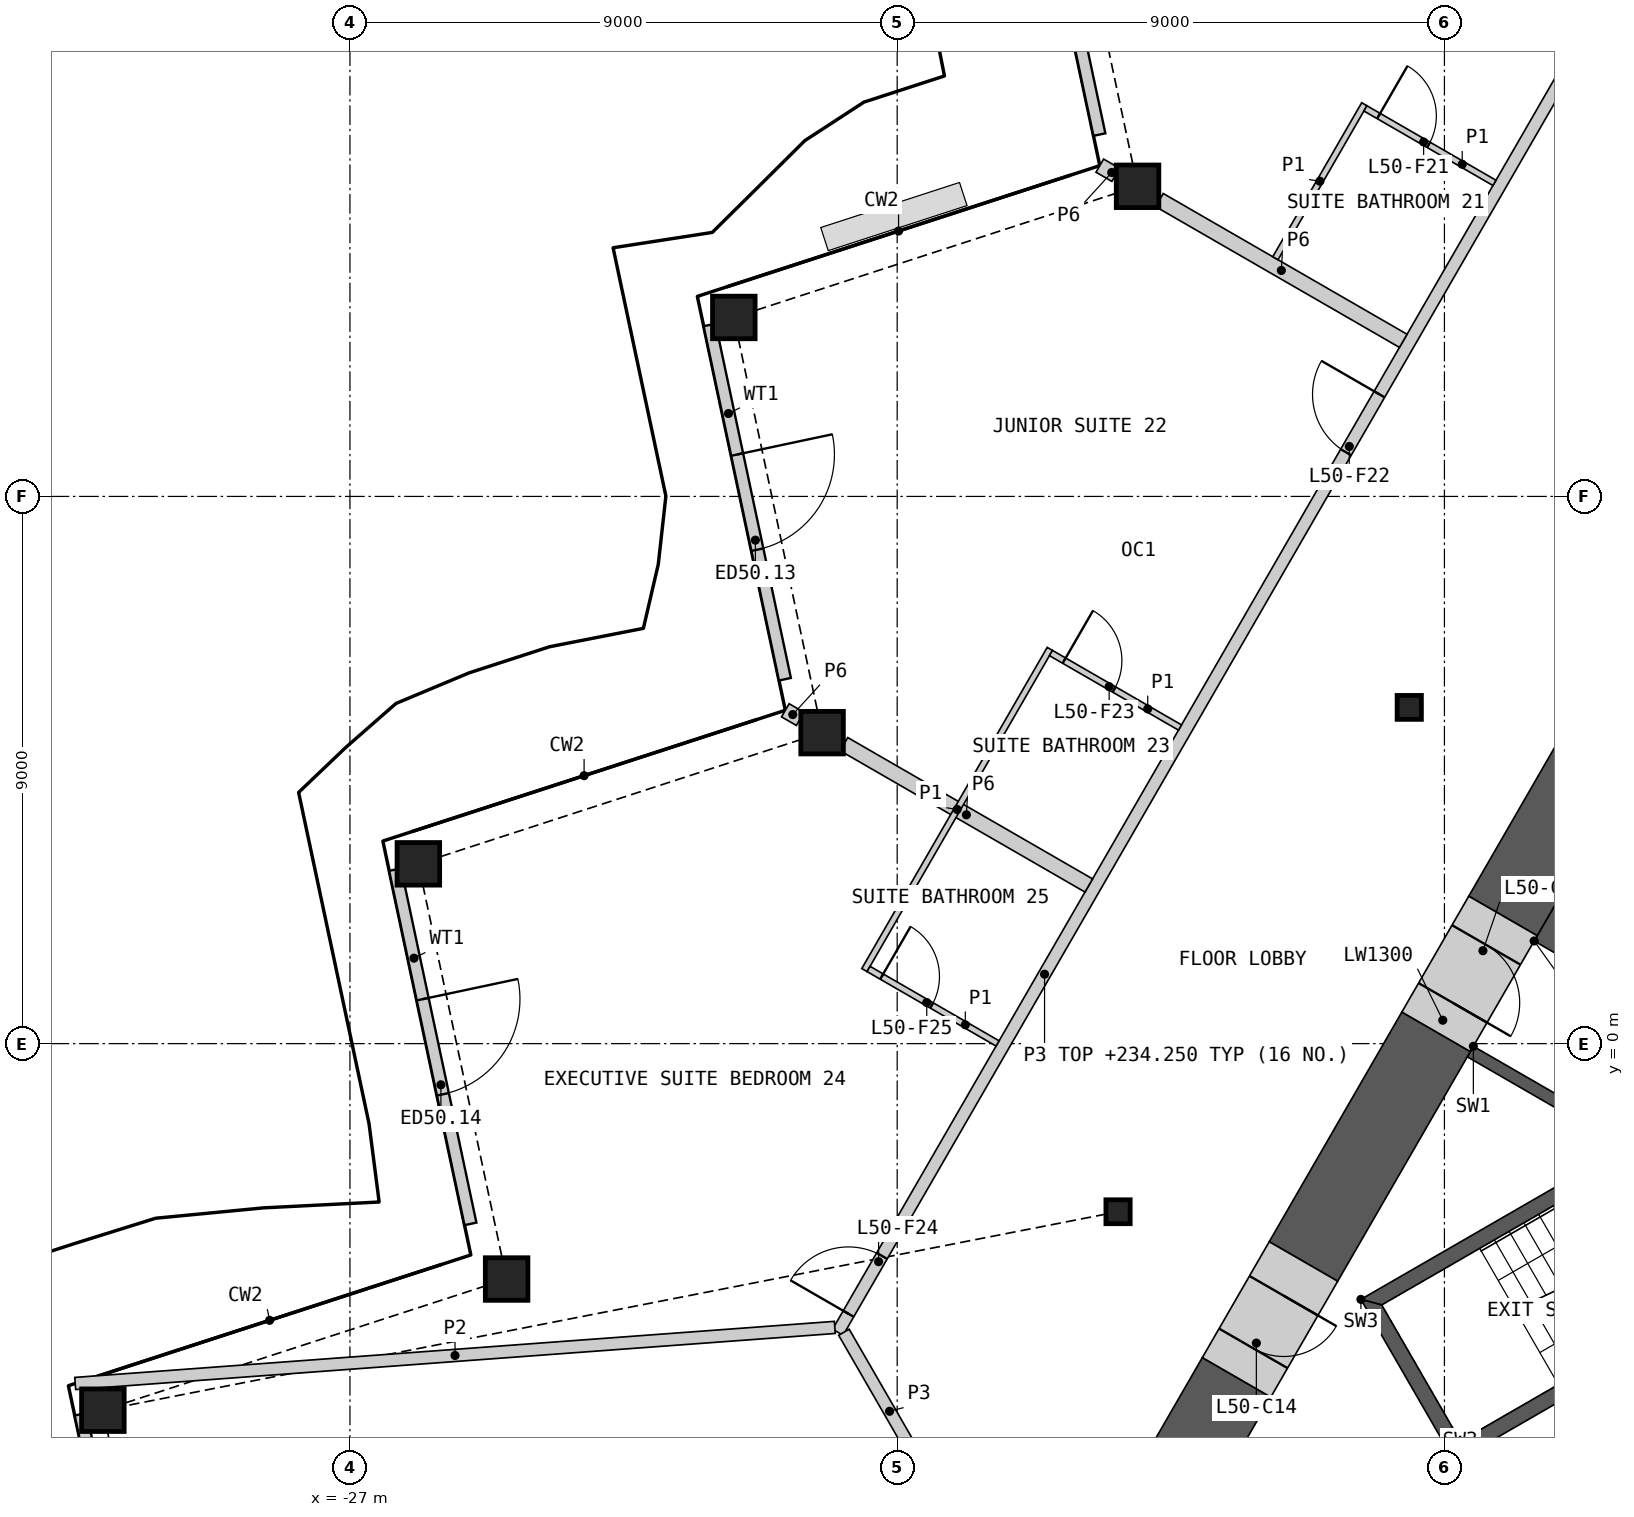
"""IFC4 building model, lengths in metres.
Left out: names, types, materials, properties, quantities, classifications, styles, units other than length and angle.
Written with IfcOpenShell. Run it as: python <this file> out.ifc"""

import sys

from ifc_helpers import new_model, si_unit, direction, frame, frame_2d, origin, origin_2d, place, context, subcontext, project, spatial, polyline, rectangle, hollow_rectangle, i_section, outline, extrude, element, fill, save


model = new_model("IFC4")
c1 = context("Model", 3, precision=1e-05, world=origin(), true_north=direction((0.0, 1.0)))
c2 = subcontext(c1, "Body", "Model", "MODEL_VIEW")
j1 = project(units=[si_unit("LENGTHUNIT", "METRE"), si_unit("PLANEANGLEUNIT", "RADIAN")], contexts=[c1])
p1 = place(None, origin())
s1 = spatial("IfcSite", under=j1, at=p1, CompositionType="ELEMENT")
p2 = place(p1, origin())
s2 = spatial("IfcBuilding", under=s1, at=p2, CompositionType="ELEMENT")
p3 = place(p2, frame((0.0, 0.0, 231.0)))
s3 = spatial("IfcBuildingStorey", under=s2, at=p3, CompositionType="ELEMENT", Elevation=231.0)
for number, where, z_axis, x_axis in (
    (1, (-14.047, 14.101, 0.0), (0.0, 0.0, 1.0), (1.0, 0.0, 0.0)),
    (2, (-20.687, 11.943, 0.0), (0.0, 0.0, 1.0), (1.0, 0.0, 0.0)),
    (3, (-19.235, 5.115, 0.0), (0.0, 0.0, 1.0), (1.0, 0.0, 0.0)),
    (4, (-25.875, 2.957, 0.0), (0.0, 0.0, 1.0), (1.0, 0.0, 0.0)),
    (5, (-24.423, -3.872, 0.0), (0.0, 0.0, 1.0), (1.0, 0.0, 0.0)),
    (6, (-31.063, -6.029, 0.0), (0.0, 0.0, 1.0), (1.0, 0.0, 0.0)),
):
    element("IfcColumn", number, at=place(p3, frame(where, z_axis=z_axis, x_axis=x_axis)), inside=s3, PredefinedType="COLUMN", context=c2, shape_type="SweptSolid", body=[
        extrude(hollow_rectangle(XDim=0.7, YDim=0.7, WallThickness=0.045, at=origin_2d()), origin(), (0.0, 0.0, 1.0), 3.6),
    ])
for number, where, z_axis, x_axis in (
    (7, (-9.578, 5.53, 0.0), (0.0, 0.0, 1.0), (1.0, 0.0, 0.0)),
    (8, (-14.368, -2.765, 0.0), (0.0, 0.0, 1.0), (1.0, 0.0, 0.0)),
):
    element("IfcColumn", number, at=place(p3, frame(where, z_axis=z_axis, x_axis=x_axis)), inside=s3, PredefinedType="COLUMN", context=c2, shape_type="SweptSolid", body=[
        extrude(i_section(OverallWidth=0.399, OverallDepth=0.393, WebThickness=0.023, FlangeThickness=0.037, at=origin_2d()), origin(), (0.0, 0.0, 1.0), 3.6),
    ])
p4 = place(p3, frame((-15.913, 20.779, 0.0), z_axis=(0.0, 0.0, 1.0), x_axis=(0.207930802022, -0.978143538327, 0.0)))
e9 = element("IfcWall", 9, at=p4, inside=s3, PredefinedType="SOLIDWALL", context=c2, shape_type="SweptSolid", body=[
    extrude(rectangle(XDim=5.958, YDim=0.2, at=frame_2d((2.979, 0.0))), origin(), (0.0, 0.0, 1.0), 2.701),
])
p5 = place(p4, frame((2.179, 0.0, 0.0)))
e10 = element("IfcOpeningElement", 10, at=p5, cuts=e9, PredefinedType="OPENING", context=c2, shape_type="SweptSolid", body=[
    extrude(rectangle(XDim=1.6, YDim=2.4, at=frame_2d((0.8, 1.2))), frame((0.0, 0.11, 0.0), z_axis=(0.0, -1.0, 0.0), x_axis=(1.0, 0.0, 0.0)), (0.0, 0.0, 1.0), 0.22),
])
p6 = place(p3, frame((-21.085, 11.821, 0.0), z_axis=(0.0, 0.0, 1.0), x_axis=(0.207930802022, -0.978143538327, 0.0)))
e11 = element("IfcWall", 11, at=p6, inside=s3, PredefinedType="SOLIDWALL", context=c2, shape_type="SweptSolid", body=[
    extrude(rectangle(XDim=5.958, YDim=0.2, at=frame_2d((2.979, 0.0))), origin(), (0.0, 0.0, 1.0), 2.701),
])
p7 = place(p6, frame((2.179, 0.0, 0.0)))
e12 = element("IfcOpeningElement", 12, at=p7, cuts=e11, PredefinedType="OPENING", context=c2, shape_type="SweptSolid", body=[
    extrude(rectangle(XDim=1.6, YDim=2.4, at=frame_2d((0.8, 1.2))), frame((0.0, 0.11, 0.0), z_axis=(0.0, -1.0, 0.0), x_axis=(1.0, 0.0, 0.0)), (0.0, 0.0, 1.0), 0.22),
])
p8 = place(p3, frame((-26.257, 2.863, 0.0), z_axis=(0.0, 0.0, 1.0), x_axis=(0.207930802022, -0.978143538327, 0.0)))
e13 = element("IfcWall", 13, at=p8, inside=s3, PredefinedType="SOLIDWALL", context=c2, shape_type="SweptSolid", body=[
    extrude(rectangle(XDim=5.958, YDim=0.2, at=frame_2d((2.979, 0.0))), origin(), (0.0, 0.0, 1.0), 2.701),
])
p9 = place(p8, frame((2.179, 0.0, 0.0)))
e14 = element("IfcOpeningElement", 14, at=p9, cuts=e13, PredefinedType="OPENING", context=c2, shape_type="SweptSolid", body=[
    extrude(rectangle(XDim=1.6, YDim=2.4, at=frame_2d((0.8, 1.2))), frame((0.0, 0.11, 0.0), z_axis=(0.0, -1.0, 0.0), x_axis=(1.0, 0.0, 0.0)), (0.0, 0.0, 1.0), 0.22),
])
p10 = place(p3, frame((-31.428, -6.095, 0.0), z_axis=(0.0, 0.0, 1.0), x_axis=(0.207939137045, -0.978141766456, 0.0)))
e15 = element("IfcWall", 15, at=p10, inside=s3, PredefinedType="SOLIDWALL", context=c2, shape_type="SweptSolid", body=[
    extrude(rectangle(XDim=5.957, YDim=0.2, at=frame_2d((2.979, 0.0))), origin(), (0.0, 0.0, 1.0), 2.701),
])
p11 = place(p10, frame((2.179, 0.0, 0.0)))
e16 = element("IfcOpeningElement", 16, at=p11, cuts=e15, PredefinedType="OPENING", context=c2, shape_type="SweptSolid", body=[
    extrude(rectangle(XDim=1.6, YDim=2.4, at=frame_2d((0.8, 1.2))), frame((0.0, 0.11, 0.0), z_axis=(0.0, -1.0, 0.0), x_axis=(1.0, 0.0, 0.0)), (0.0, 0.0, 1.0), 0.22),
])
p12 = place(p3, origin())
e17 = element("IfcWall", 17, at=p12, inside=s3, PredefinedType="SHEAR", context=c2, shape_type="SweptSolid", body=[
    extrude(outline(polyline([(-7.524, 1.688), (-4.124, 7.577), (-3.731, 7.35), (-1.561, 6.097), (-1.66, 5.924), (-3.652, 7.074), (-4.652, 5.342), (-2.66, 4.192), (-2.76, 4.019), (-4.752, 5.169), (-5.752, 3.437), (-3.76, 2.287), (-3.861, 2.113), (-5.852, 3.263), (-6.852, 1.531), (-4.861, 0.381), (-4.96, 0.208), (-7.131, 1.461), (-7.524, 1.688)])), origin(), (0.0, 0.0, 1.0), 3.25),
])
p13 = place(p3, origin())
e18 = element("IfcWall", 18, at=p13, inside=s3, PredefinedType="SHEAR", context=c2, shape_type="SweptSolid", body=[
    extrude(outline(polyline([(-8.524, -0.044), (-8.131, -0.271), (-5.96, -1.524), (-6.061, -1.697), (-8.231, -0.444), (-8.624, -0.217), (-8.524, -0.044)])), origin(), (0.0, 0.0, 1.0), 3.25),
])
p14 = place(p3, origin())
e19 = element("IfcWall", 19, at=p14, inside=s3, PredefinedType="SHEAR", context=c2, shape_type="SweptSolid", body=[
    extrude(outline(polyline([(-5.307, -1.281), (-10.374, -4.206), (-10.032, -4.298), (-5.182, -1.498), (-5.307, -1.281)])), origin(), (0.0, 0.0, 1.0), 3.25),
])
p15 = place(p3, origin())
e20 = element("IfcWall", 20, at=p15, inside=s3, PredefinedType="SHEAR", context=c2, shape_type="SweptSolid", body=[
    extrude(outline(polyline([(-10.374, -4.206), (-8.83, -6.881), (-8.738, -6.539), (-10.032, -4.298), (-10.374, -4.206)])), origin(), (0.0, 0.0, 1.0), 3.25),
])
p16 = place(p3, origin())
e21 = element("IfcWall", 21, at=p16, inside=s3, PredefinedType="SHEAR", context=c2, shape_type="SweptSolid", body=[
    extrude(outline(polyline([(-8.738, -6.539), (-8.83, -6.881), (-3.763, -3.956), (-3.888, -3.739), (-8.738, -6.539)])), origin(), (0.0, 0.0, 1.0), 3.25),
])
p17 = place(p3, frame((-4.636, 7.99, 0.0), z_axis=(0.0, 0.0, 1.0), x_axis=(-0.500022813292, -0.866012232124, 0.0)))
e22 = element("IfcWall", 22, at=p17, inside=s3, PredefinedType="SHEAR", context=c2, shape_type="SweptSolid", body=[
    extrude(rectangle(XDim=6.802, YDim=1.3, at=frame_2d((3.401, 0.0))), origin(), (0.0, 0.0, 1.0), 3.25),
])
p18 = place(p3, frame((-9.137, 0.195, 0.0), z_axis=(0.0, 0.0, 1.0), x_axis=(-0.499985697398, -0.866033661238, 0.0)))
e23 = element("IfcWall", 23, at=p18, inside=s3, PredefinedType="SHEAR", context=c2, shape_type="SweptSolid", body=[
    extrude(rectangle(XDim=4.362, YDim=1.3, at=frame_2d((2.181, 0.0))), origin(), (0.0, 0.0, 1.0), 3.25),
])
p19 = place(p3, frame((-12.418, -5.488, 0.0), z_axis=(0.0, 0.0, 1.0), x_axis=(-0.499931460552, -0.866064971437, 0.0)))
e24 = element("IfcWall", 24, at=p19, inside=s3, PredefinedType="SHEAR", context=c2, shape_type="SweptSolid", body=[
    extrude(rectangle(XDim=1.786, YDim=1.3, at=frame_2d((0.893, 0.0))), origin(), (0.0, 0.0, 1.0), 3.25),
])
p20 = place(p3, frame((-11.318, -3.583, 0.0), z_axis=(0.0, 0.0, 1.0), x_axis=(-0.50002983664, -0.866008176907, 0.0)))
e25 = element("IfcWall", 25, at=p20, inside=s3, PredefinedType="SHEAR", context=c2, shape_type="SweptSolid", body=[
    extrude(rectangle(XDim=2.2, YDim=1.3, at=frame_2d((1.1, 0.0))), origin(), (0.0, 0.0, 1.0), 3.25),
])
p21 = place(p20, frame((0.65, 0.0, 0.0)))
e26 = element("IfcOpeningElement", 26, at=p21, cuts=e25, PredefinedType="OPENING", context=c2, shape_type="SweptSolid", body=[
    extrude(rectangle(XDim=1.0, YDim=2.1, at=frame_2d((0.5, 1.05))), frame((0.0, 0.66, 0.0), z_axis=(0.0, -1.0, 0.0), x_axis=(1.0, 0.0, 0.0)), (0.0, 0.0, 1.0), 1.32),
])
p22 = place(p3, frame((-8.037, 2.1, 0.0), z_axis=(0.0, 0.0, 1.0), x_axis=(-0.50002983664, -0.866008176907, 0.0)))
e27 = element("IfcWall", 27, at=p22, inside=s3, PredefinedType="SHEAR", context=c2, shape_type="SweptSolid", body=[
    extrude(rectangle(XDim=2.2, YDim=1.3, at=frame_2d((1.1, 0.0))), origin(), (0.0, 0.0, 1.0), 3.25),
])
p23 = place(p22, frame((0.55, 0.0, 0.0)))
e28 = element("IfcOpeningElement", 28, at=p23, cuts=e27, PredefinedType="OPENING", context=c2, shape_type="SweptSolid", body=[
    extrude(rectangle(XDim=1.1, YDim=2.1, at=frame_2d((0.55, 1.05))), frame((0.0, 0.66, 0.0), z_axis=(0.0, -1.0, 0.0), x_axis=(1.0, 0.0, 0.0)), (0.0, 0.0, 1.0), 1.32),
])
p24 = place(p3, frame((-18.976, -4.747, 0.0), z_axis=(0.0, 0.0, 1.0), x_axis=(0.499999852422, 0.866025488988, 0.0)))
e29 = element("IfcWall", 29, at=p24, inside=s3, PredefinedType="PARTITIONING", context=c2, shape_type="SweptSolid", body=[
    extrude(rectangle(XDim=27.198, YDim=0.2, at=frame_2d((13.599, 0.0))), origin(), (0.0, 0.0, 1.0), 3.25),
])
p25 = place(p24, frame((25.346, 0.0, 0.0)))
e30 = element("IfcOpeningElement", 30, at=p25, cuts=e29, PredefinedType="OPENING", context=c2, shape_type="SweptSolid", body=[
    extrude(rectangle(XDim=1.1, YDim=2.1, at=frame_2d((0.55, 1.05))), frame((0.0, 0.11, 0.0), z_axis=(0.0, -1.0, 0.0), x_axis=(1.0, 0.0, 0.0)), (0.0, 0.0, 1.0), 0.22),
])
p26 = place(p24, frame((16.713, 0.0, 0.0)))
e31 = element("IfcOpeningElement", 31, at=p26, cuts=e29, PredefinedType="OPENING", context=c2, shape_type="SweptSolid", body=[
    extrude(rectangle(XDim=1.1, YDim=2.1, at=frame_2d((0.55, 1.05))), frame((0.0, 0.11, 0.0), z_axis=(0.0, -1.0, 0.0), x_axis=(1.0, 0.0, 0.0)), (0.0, 0.0, 1.0), 0.22),
])
p27 = place(p24, frame((0.35, 0.0, 0.0)))
e32 = element("IfcOpeningElement", 32, at=p27, cuts=e29, PredefinedType="OPENING", context=c2, shape_type="SweptSolid", body=[
    extrude(rectangle(XDim=1.1, YDim=2.1, at=frame_2d((0.55, 1.05))), frame((0.0, 0.11, 0.0), z_axis=(0.0, -1.0, 0.0), x_axis=(1.0, 0.0, 0.0)), (0.0, 0.0, 1.0), 0.22),
])
p28 = place(p3, frame((-18.875, 4.926, 0.0), z_axis=(0.0, 0.0, 1.0), x_axis=(0.866014168242, -0.500019460026, 0.0)))
e33 = element("IfcWall", 33, at=p28, inside=s3, PredefinedType="PARTITIONING", context=c2, shape_type="SweptSolid", body=[
    extrude(rectangle(XDim=4.649, YDim=0.25, at=frame_2d((2.324, 0.0))), origin(), (0.0, 0.0, 1.0), 2.404),
])
p29 = place(p3, frame((-13.687, 13.874, 0.0), z_axis=(0.0, 0.0, 1.0), x_axis=(0.866034555462, -0.499984148495, 0.0)))
e34 = element("IfcWall", 34, at=p29, inside=s3, PredefinedType="PARTITIONING", context=c2, shape_type="SweptSolid", body=[
    extrude(rectangle(XDim=4.63, YDim=0.25, at=frame_2d((2.315, 0.0))), origin(), (0.0, 0.0, 1.0), 2.404),
])
p30 = place(p3, frame((-18.876, -4.747, 0.0), z_axis=(0.0, 0.0, 1.0), x_axis=(0.499952404951, -0.866052881055, 0.0)))
e35 = element("IfcWall", 35, at=p30, inside=s3, PredefinedType="PARTITIONING", context=c2, shape_type="SweptSolid", body=[
    extrude(rectangle(XDim=3.002, YDim=0.2, at=frame_2d((1.501, 0.0))), origin(), (0.0, 0.0, 1.0), 3.25),
])
p31 = place(p3, frame((-14.668, 14.44, 0.0), z_axis=(0.0, 0.0, 1.0), x_axis=(0.865888485494, -0.500237074485, 0.0)))
e36 = element("IfcWall", 36, at=p31, inside=s3, PredefinedType="PARTITIONING", context=c2, shape_type="SweptSolid", body=[
    extrude(rectangle(XDim=0.301, YDim=0.25, at=frame_2d((0.15, 0.0))), origin(), (0.0, 0.0, 1.0), 2.404),
])
p32 = place(p3, frame((-19.84, 5.482, 0.0), z_axis=(0.0, 0.0, 1.0), x_axis=(0.865998287773, -0.500046963369, 0.0)))
e37 = element("IfcWall", 37, at=p32, inside=s3, PredefinedType="PARTITIONING", context=c2, shape_type="SweptSolid", body=[
    extrude(rectangle(XDim=0.282, YDim=0.25, at=frame_2d((0.141, 0.0))), origin(), (0.0, 0.0, 1.0), 2.404),
])
p33 = place(p3, frame((-31.518, -5.59, 0.0), z_axis=(0.0, 0.0, 1.0), x_axis=(0.99728681237, 0.073613951618, 0.0)))
e38 = element("IfcWall", 38, at=p33, inside=s3, PredefinedType="PARTITIONING", context=c2, shape_type="SweptSolid", body=[
    extrude(rectangle(XDim=12.526, YDim=0.2, at=frame_2d((6.263, 0.0))), origin(), (0.0, 0.0, 1.0), 2.404),
])
p34 = place(p3, frame((-18.539, 1.21, 0.0), z_axis=(0.0, 0.0, 1.0), x_axis=(0.500008851346, 0.866020293397, 0.0)))
e39 = element("IfcWall", 39, at=p34, inside=s3, PredefinedType="PARTITIONING", context=c2, shape_type="SweptSolid", body=[
    extrude(rectangle(XDim=6.1, YDim=0.1, at=frame_2d((3.05, 0.0))), origin(), (0.0, 0.0, 1.0), 2.404),
])
p35 = place(p3, frame((-11.78, 12.917, 0.0), z_axis=(0.0, 0.0, 1.0), x_axis=(0.499999433879, 0.866025730634, 0.0)))
e40 = element("IfcWall", 40, at=p35, inside=s3, PredefinedType="PARTITIONING", context=c2, shape_type="SweptSolid", body=[
    extrude(rectangle(XDim=2.925, YDim=0.1, at=frame_2d((1.462, 0.0))), origin(), (0.0, 0.0, 1.0), 2.404),
])
p36 = place(p3, frame((-15.471, 6.424, 0.0), z_axis=(0.0, 0.0, 1.0), x_axis=(0.866014668023, -0.500018594424, 0.0)))
e41 = element("IfcWall", 41, at=p36, inside=s3, PredefinedType="PARTITIONING", context=c2, shape_type="SweptSolid", body=[
    extrude(rectangle(XDim=2.45, YDim=0.1, at=frame_2d((1.225, 0.0))), origin(), (0.0, 0.0, 1.0), 2.404),
])
p37 = place(p36, frame((0.25, 0.0, 0.0)))
e42 = element("IfcOpeningElement", 42, at=p37, cuts=e41, PredefinedType="OPENING", context=c2, shape_type="SweptSolid", body=[
    extrude(rectangle(XDim=0.95, YDim=2.1, at=frame_2d((0.475, 1.05))), frame((0.0, 0.06, 0.0), z_axis=(0.0, -1.0, 0.0), x_axis=(1.0, 0.0, 0.0)), (0.0, 0.0, 1.0), 0.12),
])
p38 = place(p3, frame((-18.471, 1.228, 0.0), z_axis=(0.0, 0.0, 1.0), x_axis=(0.866057815567, -0.499943856944, 0.0)))
e43 = element("IfcWall", 43, at=p38, inside=s3, PredefinedType="PARTITIONING", context=c2, shape_type="SweptSolid", body=[
    extrude(rectangle(XDim=2.45, YDim=0.1, at=frame_2d((1.225, 0.0))), origin(), (0.0, 0.0, 1.0), 2.404),
])
p39 = place(p38, frame((0.25, 0.0, 0.0)))
e44 = element("IfcOpeningElement", 44, at=p39, cuts=e43, PredefinedType="OPENING", context=c2, shape_type="SweptSolid", body=[
    extrude(rectangle(XDim=0.95, YDim=2.1, at=frame_2d((0.475, 1.05))), frame((0.0, 0.06, 0.0), z_axis=(0.0, -1.0, 0.0), x_axis=(1.0, 0.0, 0.0)), (0.0, 0.0, 1.0), 0.12),
])
p40 = place(p3, frame((-10.299, 15.382, 0.0), z_axis=(0.0, 0.0, 1.0), x_axis=(0.866057815567, -0.499943856944, 0.0)))
e45 = element("IfcWall", 45, at=p40, inside=s3, PredefinedType="PARTITIONING", context=c2, shape_type="SweptSolid", body=[
    extrude(rectangle(XDim=2.45, YDim=0.1, at=frame_2d((1.225, 0.0))), origin(), (0.0, 0.0, 1.0), 2.404),
])
p41 = place(p40, frame((0.25, 0.0, 0.0)))
e46 = element("IfcOpeningElement", 46, at=p41, cuts=e45, PredefinedType="OPENING", context=c2, shape_type="SweptSolid", body=[
    extrude(rectangle(XDim=0.95, YDim=2.1, at=frame_2d((0.475, 1.05))), frame((0.0, 0.06, 0.0), z_axis=(0.0, -1.0, 0.0), x_axis=(1.0, 0.0, 0.0)), (0.0, 0.0, 1.0), 0.12),
])
p42 = place(p7, origin())
e47 = element("IfcDoor", 47, at=p42, inside=s3, OperationType="DOUBLE_DOOR_SINGLE_SWING", PredefinedType="DOOR", context=c2, shape_type="SweptSolid", body=[
    extrude(rectangle(XDim=1.6, YDim=2.4, at=frame_2d((0.8, 1.2))), frame((0.0, 0.025, 0.0), z_axis=(0.0, -1.0, 0.0), x_axis=(1.0, 0.0, 0.0)), (0.0, 0.0, 1.0), 0.05),
])
fill(e12, e47)
p43 = place(p9, origin())
e48 = element("IfcDoor", 48, at=p43, inside=s3, OperationType="DOUBLE_DOOR_SINGLE_SWING", PredefinedType="DOOR", context=c2, shape_type="SweptSolid", body=[
    extrude(rectangle(XDim=1.6, YDim=2.4, at=frame_2d((0.8, 1.2))), frame((0.0, 0.025, 0.0), z_axis=(0.0, -1.0, 0.0), x_axis=(1.0, 0.0, 0.0)), (0.0, 0.0, 1.0), 0.05),
])
fill(e14, e48)
p44 = place(p21, origin())
e49 = element("IfcDoor", 49, at=p44, inside=s3, OperationType="SINGLE_SWING_LEFT", PredefinedType="DOOR", context=c2, shape_type="SweptSolid", body=[
    extrude(rectangle(XDim=1.0, YDim=2.1, at=frame_2d((0.5, 1.05))), frame((0.0, 0.405, 0.0), z_axis=(0.0, -1.0, 0.0), x_axis=(1.0, 0.0, 0.0)), (0.0, 0.0, 1.0), 0.05),
])
fill(e26, e49)
p45 = place(p23, origin())
e50 = element("IfcDoor", 50, at=p45, inside=s3, OperationType="SINGLE_SWING_RIGHT", PredefinedType="DOOR", context=c2, shape_type="SweptSolid", body=[
    extrude(rectangle(XDim=1.1, YDim=2.1, at=frame_2d((0.55, 1.05))), frame((0.0, 0.405, 0.0), z_axis=(0.0, -1.0, 0.0), x_axis=(1.0, 0.0, 0.0)), (0.0, 0.0, 1.0), 0.05),
])
fill(e28, e50)
p46 = place(p41, origin())
e51 = element("IfcDoor", 51, at=p46, inside=s3, OperationType="SINGLE_SWING_LEFT", PredefinedType="DOOR", context=c2, shape_type="SweptSolid", body=[
    extrude(rectangle(XDim=0.95, YDim=2.1, at=frame_2d((0.475, 1.05))), frame((0.0, 0.025, 0.0), z_axis=(0.0, -1.0, 0.0), x_axis=(1.0, 0.0, 0.0)), (0.0, 0.0, 1.0), 0.05),
])
fill(e46, e51)
p47 = place(p26, origin())
e52 = element("IfcDoor", 52, at=p47, inside=s3, OperationType="SINGLE_SWING_RIGHT", PredefinedType="DOOR", context=c2, shape_type="SweptSolid", body=[
    extrude(rectangle(XDim=1.1, YDim=2.1, at=frame_2d((0.55, 1.05))), frame((0.0, 0.025, 0.0), z_axis=(0.0, -1.0, 0.0), x_axis=(1.0, 0.0, 0.0)), (0.0, 0.0, 1.0), 0.05),
])
fill(e31, e52)
p48 = place(p37, origin())
e53 = element("IfcDoor", 53, at=p48, inside=s3, OperationType="SINGLE_SWING_LEFT", PredefinedType="DOOR", context=c2, shape_type="SweptSolid", body=[
    extrude(rectangle(XDim=0.95, YDim=2.1, at=frame_2d((0.475, 1.05))), frame((0.0, 0.025, 0.0), z_axis=(0.0, -1.0, 0.0), x_axis=(1.0, 0.0, 0.0)), (0.0, 0.0, 1.0), 0.05),
])
fill(e42, e53)
p49 = place(p27, origin())
e54 = element("IfcDoor", 54, at=p49, inside=s3, OperationType="SINGLE_SWING_LEFT", PredefinedType="DOOR", context=c2, shape_type="SweptSolid", body=[
    extrude(rectangle(XDim=1.1, YDim=2.1, at=frame_2d((0.55, 1.05))), frame((0.0, 0.025, 0.0), z_axis=(0.0, -1.0, 0.0), x_axis=(1.0, 0.0, 0.0)), (0.0, 0.0, 1.0), 0.05),
])
fill(e32, e54)
p50 = place(p39, origin())
e55 = element("IfcDoor", 55, at=p50, inside=s3, OperationType="SINGLE_SWING_LEFT", PredefinedType="DOOR", context=c2, shape_type="SweptSolid", body=[
    extrude(rectangle(XDim=0.95, YDim=2.1, at=frame_2d((0.475, 1.05))), frame((0.0, 0.025, 0.0), z_axis=(0.0, -1.0, 0.0), x_axis=(1.0, 0.0, 0.0)), (0.0, 0.0, 1.0), 0.05),
])
fill(e44, e55)
save(model, sys.argv[1])
